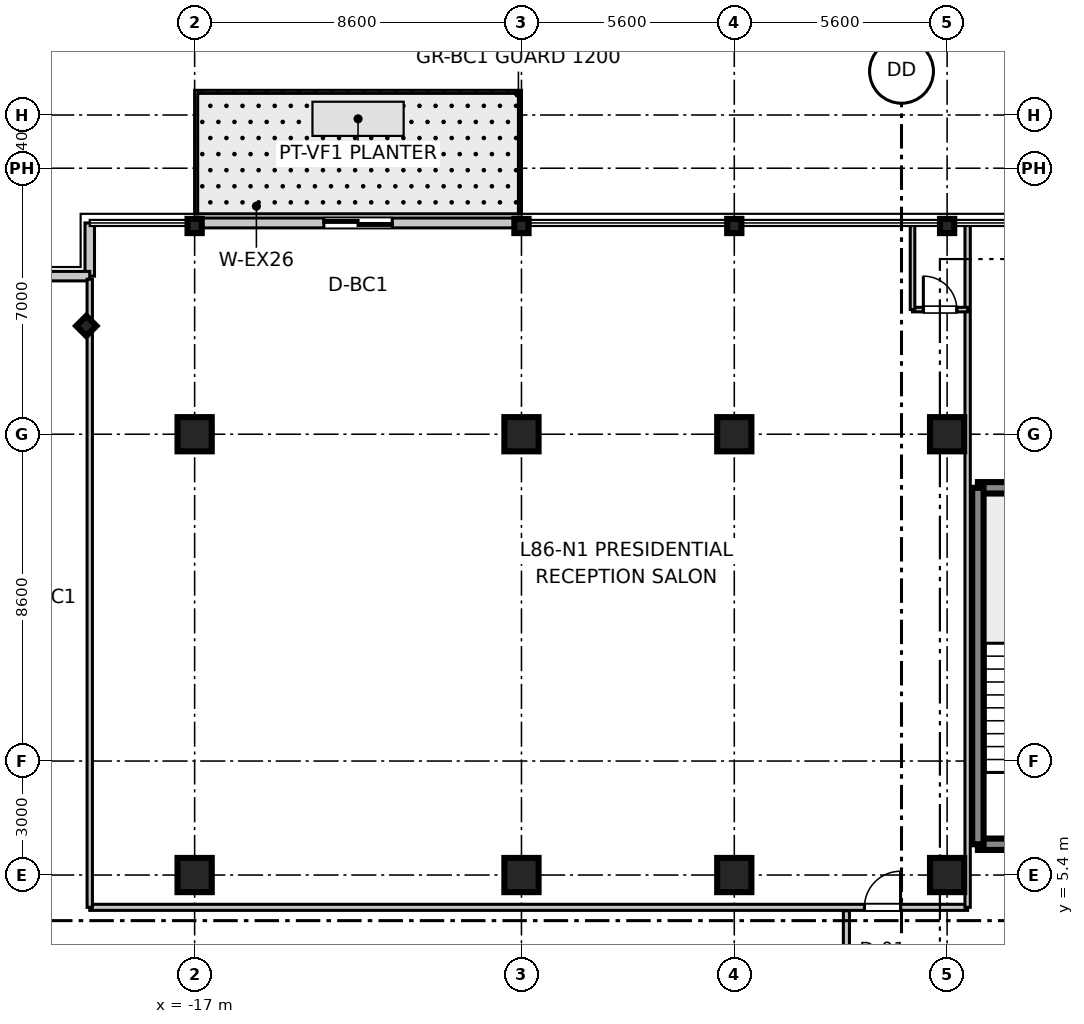
"""IFC4 building model, lengths in metres.
Left out: names, types, materials, properties, quantities, classifications, styles, units other than length and angle.
Written with IfcOpenShell. Run it as: python <this file> out.ifc"""

import sys

from ifc_helpers import new_model, si_unit, direction, frame, frame_2d, origin, origin_2d, place, context, subcontext, project, spatial, rectangle, i_section, extrude, source, transform, mapped, element, fill, save


model = new_model("IFC4")
c1 = context("Model", 3, precision=1e-05, world=origin(), true_north=direction((0.0, 1.0)))
c2 = subcontext(c1, "Body", "Model", "MODEL_VIEW")
j1 = project(units=[si_unit("LENGTHUNIT", "METRE"), si_unit("PLANEANGLEUNIT", "RADIAN")], contexts=[c1])
p1 = place(None, origin())
s1 = spatial("IfcSite", under=j1, at=p1, CompositionType="ELEMENT")
p2 = place(p1, origin())
s2 = spatial("IfcBuilding", under=s1, at=p2, CompositionType="ELEMENT")
p3 = place(p2, frame((0.0, 0.0, 334.75)))
s3 = spatial("IfcBuildingStorey", under=s2, at=p3, CompositionType="ELEMENT", Elevation=334.75)
m1 = source(origin(), c2, "Body", "SweptSolid", [
    extrude(rectangle(XDim=0.9, YDim=0.9, at=origin_2d()), origin(), (0.0, 0.0, 1.0), 3.755),
])
for number, where, z_axis, x_axis in (
    (1, (-17.0, 5.4, 0.0), (0.0, 0.0, 1.0), (1.0, 0.0, 0.0)),
    (2, (-17.0, 17.0, 0.0), (0.0, 0.0, 1.0), (1.0, 0.0, 0.0)),
    (3, (-8.4, 5.4, 0.0), (0.0, 0.0, 1.0), (1.0, 0.0, 0.0)),
    (4, (-8.4, 17.0, 0.0), (0.0, 0.0, 1.0), (1.0, 0.0, 0.0)),
    (5, (-2.8, 5.4, 0.0), (0.0, 0.0, 1.0), (1.0, 0.0, 0.0)),
    (6, (-2.8, 17.0, 0.0), (0.0, 0.0, 1.0), (1.0, 0.0, 0.0)),
    (7, (2.8, 5.4, 0.0), (0.0, 0.0, 1.0), (1.0, 0.0, 0.0)),
    (8, (2.8, 17.0, 0.0), (0.0, 0.0, 1.0), (1.0, 0.0, 0.0)),
):
    element("IfcColumn", number, at=place(p3, frame(where, z_axis=z_axis, x_axis=x_axis)), inside=s3, PredefinedType="COLUMN", context=c2, shape_type="MappedRepresentation", body=[
        mapped(m1, transform((0.0, 0.0, 0.0), scale=1.0)),
    ])
m2 = source(origin(), c2, "Body", "SweptSolid", [
    extrude(i_section(OverallWidth=0.374, OverallDepth=0.374, WebThickness=0.014, FlangeThickness=0.023, at=origin_2d()), origin(), (0.0, 0.0, 1.0), 3.755),
])
for number, where, z_axis, x_axis in (
    (9, (-17.0, 22.48, 0.0), (0.0, 0.0, 1.0), (0.0, 1.0, 0.0)),
    (10, (-8.4, 22.48, 0.0), (0.0, 0.0, 1.0), (0.0, 1.0, 0.0)),
    (11, (-2.8, 22.48, 0.0), (0.0, 0.0, 1.0), (0.0, 1.0, 0.0)),
    (12, (2.8, 22.48, 0.0), (0.0, 0.0, 1.0), (0.0, 1.0, 0.0)),
    (13, (-19.85, 19.85, 0.0), (0.0, 0.0, 1.0), (0.707, 0.707, 0.0)),
):
    element("IfcColumn", number, at=place(p3, frame(where, z_axis=z_axis, x_axis=x_axis)), inside=s3, PredefinedType="COLUMN", context=c2, shape_type="MappedRepresentation", body=[
        mapped(m2, transform((0.0, 0.0, 0.0), scale=1.0)),
    ])
m3 = source(origin(), c2, "Body", "SweptSolid", [
    extrude(rectangle(XDim=3.98, YDim=0.3, at=frame_2d((1.99, 0.0))), origin(), (0.0, 0.0, 1.0), 3.47),
])
for number, where, z_axis, x_axis in (
    (14, (3.61, 6.21, 0.0), (0.0, 0.0, 1.0), (1.0, 0.0, 0.0)),
    (15, (3.61, 15.59, 0.0), (0.0, 0.0, 1.0), (1.0, 0.0, 0.0)),
):
    element("IfcWall", number, at=place(p3, frame(where, z_axis=z_axis, x_axis=x_axis)), inside=s3, PredefinedType="SHEAR", context=c2, shape_type="MappedRepresentation", body=[
        mapped(m3, transform((0.0, 0.0, 0.0), scale=1.0)),
    ])
m4 = source(origin(), c2, "Body", "SweptSolid", [
    extrude(rectangle(XDim=9.38, YDim=0.3, at=frame_2d((4.69, 0.0))), origin(), (0.0, 0.0, 1.0), 3.47),
])
p4 = place(p3, frame((3.61, 6.21, 0.0), z_axis=(0.0, 0.0, 1.0), x_axis=(0.0, 1.0, 0.0)))
e16 = element("IfcWall", 16, at=p4, inside=s3, PredefinedType="SHEAR", context=c2, shape_type="MappedRepresentation", body=[
    mapped(m4, transform((0.0, 0.0, 0.0), scale=1.0)),
])
m5 = source(origin(), c2, "Body", "SweptSolid", [
    extrude(rectangle(XDim=1.4, YDim=0.25, at=frame_2d((0.7, 0.0))), origin(), (0.0, 0.0, 1.0), 3.47),
])
p5 = place(p3, frame((-19.76, 21.16, 0.0), z_axis=(0.0, 0.0, 1.0), x_axis=(0.0, 1.0, 0.0)))
e17 = element("IfcWall", 17, at=p5, inside=s3, PredefinedType="STANDARD", context=c2, shape_type="MappedRepresentation", body=[
    mapped(m5, transform((0.0, 0.0, 0.0), scale=1.0)),
])
m6 = source(origin(), c2, "Body", "SweptSolid", [
    extrude(rectangle(XDim=1.4, YDim=0.25, at=frame_2d((0.7, 0.0))), origin(), (0.0, 0.0, 1.0), 3.47),
])
p6 = place(p3, frame((-21.16, 21.16, 0.0), z_axis=(0.0, 0.0, 1.0), x_axis=(1.0, 0.0, 0.0)))
e18 = element("IfcWall", 18, at=p6, inside=s3, PredefinedType="STANDARD", context=c2, shape_type="MappedRepresentation", body=[
    mapped(m6, transform((0.0, 0.0, 0.0), scale=1.0)),
])
m7 = source(origin(), c2, "Body", "SweptSolid", [
    extrude(rectangle(XDim=8.6, YDim=0.26, at=frame_2d((4.3, 0.0))), origin(), (0.0, 0.0, 1.0), 2.95),
])
p7 = place(p3, frame((-17.0, 22.56, 0.0), z_axis=(0.0, 0.0, 1.0), x_axis=(1.0, 0.0, 0.0)))
e19 = element("IfcWall", 19, at=p7, inside=s3, PredefinedType="STANDARD", context=c2, shape_type="MappedRepresentation", body=[
    mapped(m7, transform((0.0, 0.0, 0.0), scale=1.0)),
])
p8 = place(p7, frame((3.4, 0.0, 0.0)))
e20 = element("IfcOpeningElement", 20, at=p8, cuts=e19, PredefinedType="OPENING", context=c2, shape_type="SweptSolid", body=[
    extrude(rectangle(XDim=1.8, YDim=2.25, at=frame_2d((0.9, 1.125))), frame((0.0, 0.14, 0.0), z_axis=(0.0, -1.0, 0.0), x_axis=(1.0, 0.0, 0.0)), (0.0, 0.0, 1.0), 0.28),
])
m8 = source(origin(), c2, "Body", "SweptSolid", [
    extrude(rectangle(XDim=23.1, YDim=0.16, at=frame_2d((11.55, 0.0))), origin(), (0.0, 0.0, 1.0), 2.81),
])
p9 = place(p3, frame((-19.76, 4.55, 0.0), z_axis=(0.0, 0.0, 1.0), x_axis=(1.0, 0.0, 0.0)))
e21 = element("IfcWall", 21, at=p9, inside=s3, PredefinedType="PARTITIONING", context=c2, shape_type="MappedRepresentation", body=[
    mapped(m8, transform((0.0, 0.0, 0.0), scale=1.0)),
])
p10 = place(p9, frame((20.385, 0.0, 0.0)))
e22 = element("IfcOpeningElement", 22, at=p10, cuts=e21, PredefinedType="OPENING", context=c2, shape_type="SweptSolid", body=[
    extrude(rectangle(XDim=0.95, YDim=2.1, at=frame_2d((0.475, 1.05))), frame((0.0, 0.09, 0.0), z_axis=(0.0, -1.0, 0.0), x_axis=(1.0, 0.0, 0.0)), (0.0, 0.0, 1.0), 0.18),
])
m9 = source(origin(), c2, "Body", "SweptSolid", [
    extrude(rectangle(XDim=16.53, YDim=0.14, at=frame_2d((8.265, 0.0))), origin(), (0.0, 0.0, 1.0), 2.81),
])
p11 = place(p3, frame((-19.76, 4.55, 0.0), z_axis=(0.0, 0.0, 1.0), x_axis=(0.0, 1.0, 0.0)))
e23 = element("IfcWall", 23, at=p11, inside=s3, PredefinedType="PARTITIONING", context=c2, shape_type="MappedRepresentation", body=[
    mapped(m9, transform((0.0, 0.0, 0.0), scale=1.0)),
])
m10 = source(origin(), c2, "Body", "SweptSolid", [
    extrude(rectangle(XDim=17.95, YDim=0.14, at=frame_2d((8.975, 0.0))), origin(), (0.0, 0.0, 1.0), 2.81),
])
p12 = place(p3, frame((3.34, 4.55, 0.0), z_axis=(0.0, 0.0, 1.0), x_axis=(0.0, 1.0, 0.0)))
e24 = element("IfcWall", 24, at=p12, inside=s3, PredefinedType="PARTITIONING", context=c2, shape_type="MappedRepresentation", body=[
    mapped(m10, transform((0.0, 0.0, 0.0), scale=1.0)),
])
m11 = source(origin(), c2, "Body", "SweptSolid", [
    extrude(rectangle(XDim=1.45, YDim=0.12, at=frame_2d((0.725, 0.0))), origin(), (0.0, 0.0, 1.0), 2.81),
])
p13 = place(p3, frame((1.89, 20.28, 0.0), z_axis=(0.0, 0.0, 1.0), x_axis=(1.0, 0.0, 0.0)))
e25 = element("IfcWall", 25, at=p13, inside=s3, PredefinedType="PARTITIONING", context=c2, shape_type="MappedRepresentation", body=[
    mapped(m11, transform((0.0, 0.0, 0.0), scale=1.0)),
])
p14 = place(p13, frame((0.285, 0.0, 0.0)))
e26 = element("IfcOpeningElement", 26, at=p14, cuts=e25, PredefinedType="OPENING", context=c2, shape_type="SweptSolid", body=[
    extrude(rectangle(XDim=0.88, YDim=2.1, at=frame_2d((0.44, 1.05))), frame((0.0, 0.07, 0.0), z_axis=(0.0, -1.0, 0.0), x_axis=(1.0, 0.0, 0.0)), (0.0, 0.0, 1.0), 0.14),
])
m12 = source(origin(), c2, "Body", "SweptSolid", [
    extrude(rectangle(XDim=2.22, YDim=0.12, at=frame_2d((1.11, 0.0))), origin(), (0.0, 0.0, 1.0), 2.81),
])
p15 = place(p3, frame((1.89, 20.28, 0.0), z_axis=(0.0, 0.0, 1.0), x_axis=(0.0, 1.0, 0.0)))
e27 = element("IfcWall", 27, at=p15, inside=s3, PredefinedType="PARTITIONING", context=c2, shape_type="MappedRepresentation", body=[
    mapped(m12, transform((0.0, 0.0, 0.0), scale=1.0)),
])
m13 = source(origin(), c2, "Body", "SweptSolid", [
    extrude(rectangle(XDim=6.88, YDim=0.16, at=frame_2d((3.44, 0.0))), origin(), (0.0, 0.0, 1.0), 2.81),
])
p16 = place(p3, frame((0.15, -2.42, 0.0), z_axis=(0.0, 0.0, 1.0), x_axis=(0.0, 1.0, 0.0)))
e28 = element("IfcWall", 28, at=p16, inside=s3, PredefinedType="PARTITIONING", context=c2, shape_type="MappedRepresentation", body=[
    mapped(m13, transform((0.0, 0.0, 0.0), scale=1.0)),
])
m14 = source(origin(), c2, "Body", "SweptSolid", [
    extrude(rectangle(XDim=0.88, YDim=2.1, at=frame_2d((0.44, 1.05))), frame((0.0, 0.025, 0.0), z_axis=(0.0, -1.0, 0.0), x_axis=(1.0, 0.0, 0.0)), (0.0, 0.0, 1.0), 0.05),
])
p17 = place(p14, origin())
e29 = element("IfcDoor", 29, at=p17, inside=s3, OperationType="SINGLE_SWING_LEFT", PredefinedType="DOOR", context=c2, shape_type="MappedRepresentation", body=[
    mapped(m14, transform((0.0, 0.0, 0.0), scale=1.0)),
])
fill(e26, e29)
m15 = source(origin(), c2, "Body", "SweptSolid", [
    extrude(rectangle(XDim=0.95, YDim=2.1, at=frame_2d((0.475, 1.05))), frame((0.0, 0.025, 0.0), z_axis=(0.0, -1.0, 0.0), x_axis=(1.0, 0.0, 0.0)), (0.0, 0.0, 1.0), 0.05),
])
p18 = place(p10, origin())
e30 = element("IfcDoor", 30, at=p18, inside=s3, OperationType="SINGLE_SWING_RIGHT", PredefinedType="DOOR", context=c2, shape_type="MappedRepresentation", body=[
    mapped(m15, transform((0.0, 0.0, 0.0), scale=1.0)),
])
fill(e22, e30)
m16 = source(origin(), c2, "Body", "SweptSolid", [
    extrude(rectangle(XDim=1.8, YDim=2.25, at=frame_2d((0.9, 1.125))), frame((0.0, 0.025, 0.0), z_axis=(0.0, -1.0, 0.0), x_axis=(1.0, 0.0, 0.0)), (0.0, 0.0, 1.0), 0.05),
])
p19 = place(p8, origin())
e31 = element("IfcDoor", 31, at=p19, inside=s3, OperationType="DOUBLE_DOOR_SLIDING", PredefinedType="DOOR", context=c2, shape_type="MappedRepresentation", body=[
    mapped(m16, transform((0.0, 0.0, 0.0), scale=1.0)),
])
fill(e20, e31)
save(model, sys.argv[1])
